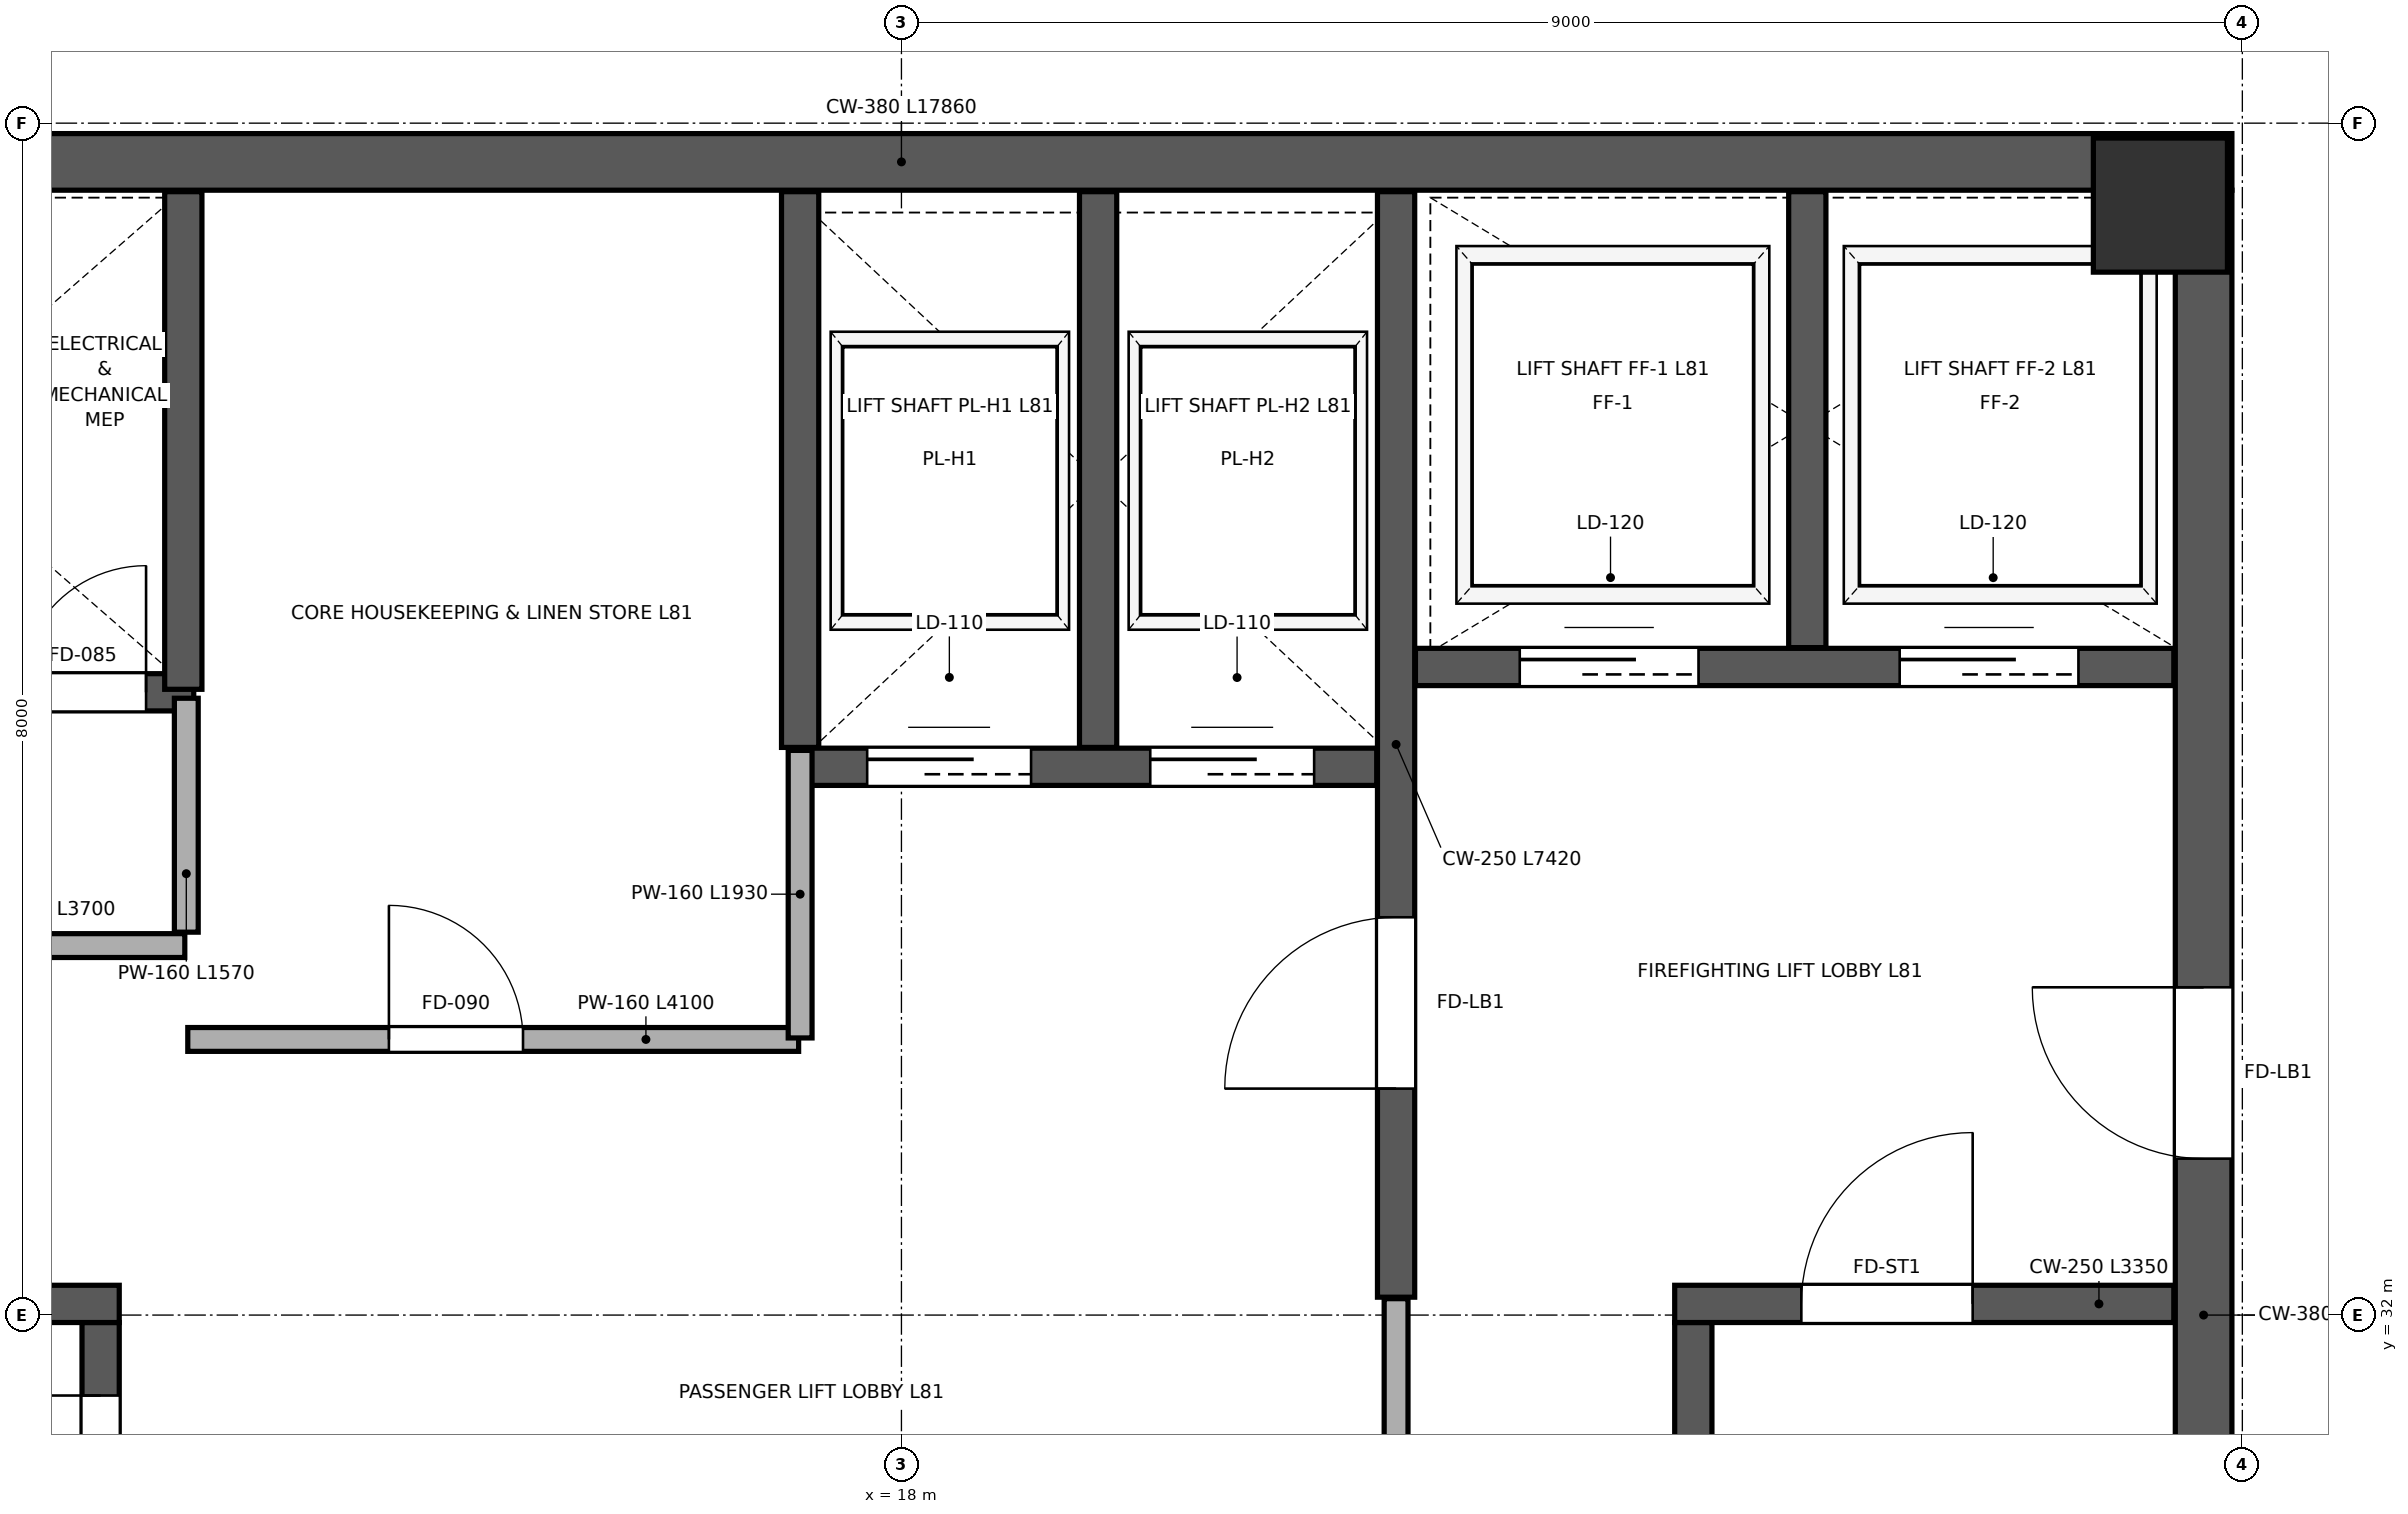
"""IFC4 building model, lengths in metres.
Left out: names, types, materials, properties, quantities, classifications, styles, units other than length and angle.
Written with IfcOpenShell. Run it as: python <this file> out.ifc"""

import sys

from ifc_helpers import new_model, si_unit, direction, frame, frame_2d, origin, origin_2d, place, context, subcontext, project, spatial, rectangle, extrude, source, transform, mapped, element, fill, save


model = new_model("IFC4")
c1 = context("Model", 3, precision=1e-05, world=origin(), true_north=direction((0.0, 1.0)))
c2 = subcontext(c1, "Body", "Model", "MODEL_VIEW")
j1 = project(units=[si_unit("LENGTHUNIT", "METRE"), si_unit("PLANEANGLEUNIT", "RADIAN")], contexts=[c1])
p1 = place(None, origin())
s1 = spatial("IfcSite", under=j1, at=p1, CompositionType="ELEMENT")
p2 = place(p1, origin())
s2 = spatial("IfcBuilding", under=s1, at=p2, CompositionType="ELEMENT")
p3 = place(p2, frame((0.0, 0.0, 360.0)))
s3 = spatial("IfcBuildingStorey", under=s2, at=p3, CompositionType="ELEMENT", Elevation=360.0)
m1 = source(origin(), c2, "Body", "SweptSolid", [
    extrude(rectangle(XDim=0.9, YDim=0.9, at=origin_2d()), origin(), (0.0, 0.0, 1.0), 5.999),
])
p4 = place(p3, frame((26.45, 39.45, 0.001), z_axis=(0.0, 0.0, 1.0), x_axis=(1.0, 0.0, 0.0)))
e1 = element("IfcColumn", 1, at=p4, inside=s3, PredefinedType="COLUMN", context=c2, shape_type="MappedRepresentation", body=[
    mapped(m1, transform((0.0, 0.0, 0.0), scale=1.0)),
])
p5 = place(p3, frame((26.74, 24.45, 0.0), z_axis=(0.0, 0.0, 1.0), x_axis=(0.0, 1.0, 0.0)))
e2 = element("IfcWall", 2, at=p5, inside=s3, PredefinedType="SHEAR", context=c2, shape_type="SweptSolid", body=[
    extrude(rectangle(XDim=15.1, YDim=0.38, at=frame_2d((7.55, 0.0))), origin(), (0.0, 0.0, 1.0), 5.72),
])
p6 = place(p5, frame((8.6, 0.0, 0.0)))
e3 = element("IfcOpeningElement", 3, at=p6, cuts=e2, PredefinedType="OPENING", context=c2, shape_type="SweptSolid", body=[
    extrude(rectangle(XDim=1.15, YDim=2.2, at=frame_2d((0.575, 1.1))), frame((0.0, 0.2, 0.0), z_axis=(0.0, -1.0, 0.0), x_axis=(1.0, 0.0, 0.0)), (0.0, 0.0, 1.0), 0.4),
])
p7 = place(p3, frame((9.07, 39.74, 0.0), z_axis=(0.0, 0.0, 1.0), x_axis=(1.0, 0.0, 0.0)))
e4 = element("IfcWall", 4, at=p7, inside=s3, PredefinedType="SHEAR", context=c2, shape_type="SweptSolid", body=[
    extrude(rectangle(XDim=17.86, YDim=0.38, at=frame_2d((8.93, 0.0))), origin(), (0.0, 0.0, 1.0), 5.72),
])
p8 = place(p3, frame((12.625, 24.46, 0.0), z_axis=(0.0, 0.0, 1.0), x_axis=(0.0, 1.0, 0.0)))
e5 = element("IfcWall", 5, at=p8, inside=s3, PredefinedType="SHEAR", context=c2, shape_type="SweptSolid", body=[
    extrude(rectangle(XDim=7.49, YDim=0.25, at=frame_2d((3.745, 0.0))), origin(), (0.0, 0.0, 1.0), 5.72),
])
p9 = place(p8, frame((5.85, 0.0, 0.0)))
e6 = element("IfcOpeningElement", 6, at=p9, cuts=e5, PredefinedType="OPENING", context=c2, shape_type="SweptSolid", body=[
    extrude(rectangle(XDim=1.15, YDim=2.2, at=frame_2d((0.575, 1.1))), frame((0.0, 0.135, 0.0), z_axis=(0.0, -1.0, 0.0), x_axis=(1.0, 0.0, 0.0)), (0.0, 0.0, 1.0), 0.27),
])
p10 = place(p3, frame((9.46, 32.075, 0.0), z_axis=(0.0, 0.0, 1.0), x_axis=(1.0, 0.0, 0.0)))
e7 = element("IfcWall", 7, at=p10, inside=s3, PredefinedType="SHEAR", context=c2, shape_type="SweptSolid", body=[
    extrude(rectangle(XDim=3.29, YDim=0.25, at=frame_2d((1.645, 0.0))), origin(), (0.0, 0.0, 1.0), 5.72),
])
p11 = place(p3, frame((23.315, 24.46, 0.0), z_axis=(0.0, 0.0, 1.0), x_axis=(0.0, 1.0, 0.0)))
e8 = element("IfcWall", 8, at=p11, inside=s3, PredefinedType="SHEAR", context=c2, shape_type="SweptSolid", body=[
    extrude(rectangle(XDim=7.49, YDim=0.25, at=frame_2d((3.745, 0.0))), origin(), (0.0, 0.0, 1.0), 5.72),
])
p12 = place(p3, frame((23.19, 32.075, 0.0), z_axis=(0.0, 0.0, 1.0), x_axis=(1.0, 0.0, 0.0)))
e9 = element("IfcWall", 9, at=p12, inside=s3, PredefinedType="SHEAR", context=c2, shape_type="SweptSolid", body=[
    extrude(rectangle(XDim=3.35, YDim=0.25, at=frame_2d((1.675, 0.0))), origin(), (0.0, 0.0, 1.0), 5.72),
])
p13 = place(p12, frame((0.85, 0.0, 0.0)))
e10 = element("IfcOpeningElement", 10, at=p13, cuts=e9, PredefinedType="OPENING", context=c2, shape_type="SweptSolid", body=[
    extrude(rectangle(XDim=1.15, YDim=2.2, at=frame_2d((0.575, 1.1))), frame((0.0, 0.135, 0.0), z_axis=(0.0, -1.0, 0.0), x_axis=(1.0, 0.0, 0.0)), (0.0, 0.0, 1.0), 0.27),
])
p14 = place(p3, frame((21.32, 32.12, 0.0), z_axis=(0.0, 0.0, 1.0), x_axis=(0.0, 1.0, 0.0)))
e11 = element("IfcWall", 11, at=p14, inside=s3, PredefinedType="SHEAR", context=c2, shape_type="SweptSolid", body=[
    extrude(rectangle(XDim=7.42, YDim=0.25, at=frame_2d((3.71, 0.0))), origin(), (0.0, 0.0, 1.0), 5.72),
])
p15 = place(p14, frame((1.4, 0.0, 0.0)))
e12 = element("IfcOpeningElement", 12, at=p15, cuts=e11, PredefinedType="OPENING", context=c2, shape_type="SweptSolid", body=[
    extrude(rectangle(XDim=1.15, YDim=2.2, at=frame_2d((0.575, 1.1))), frame((0.0, 0.135, 0.0), z_axis=(0.0, -1.0, 0.0), x_axis=(1.0, 0.0, 0.0)), (0.0, 0.0, 1.0), 0.27),
])
p16 = place(p3, frame((9.46, 36.18, 0.0), z_axis=(0.0, 0.0, 1.0), x_axis=(1.0, 0.0, 0.0)))
e13 = element("IfcWall", 13, at=p16, inside=s3, PredefinedType="SHEAR", context=c2, shape_type="SweptSolid", body=[
    extrude(rectangle(XDim=3.79, YDim=0.25, at=frame_2d((1.895, 0.0))), origin(), (0.0, 0.0, 1.0), 5.72),
])
p17 = place(p16, frame((2.62, 0.0, 0.0)))
e14 = element("IfcOpeningElement", 14, at=p17, cuts=e13, PredefinedType="OPENING", context=c2, shape_type="SweptSolid", body=[
    extrude(rectangle(XDim=0.85, YDim=2.1, at=frame_2d((0.425, 1.05))), frame((0.0, 0.135, 0.0), z_axis=(0.0, -1.0, 0.0), x_axis=(1.0, 0.0, 0.0)), (0.0, 0.0, 1.0), 0.27),
])
p18 = place(p16, frame((0.85, 0.0, 0.0)))
e15 = element("IfcOpeningElement", 15, at=p18, cuts=e13, PredefinedType="OPENING", context=c2, shape_type="SweptSolid", body=[
    extrude(rectangle(XDim=1.3, YDim=2.25, at=frame_2d((0.65, 1.125))), frame((0.0, 0.135, 0.0), z_axis=(0.0, -1.0, 0.0), x_axis=(1.0, 0.0, 0.0)), (0.0, 0.0, 1.0), 0.27),
])
p19 = place(p3, frame((21.45, 36.35, 0.0), z_axis=(0.0, 0.0, 1.0), x_axis=(1.0, 0.0, 0.0)))
e16 = element("IfcWall", 16, at=p19, inside=s3, PredefinedType="SHEAR", context=c2, shape_type="SweptSolid", body=[
    extrude(rectangle(XDim=5.09, YDim=0.25, at=frame_2d((2.545, 0.0))), origin(), (0.0, 0.0, 1.0), 5.72),
])
p20 = place(p19, frame((0.7, 0.0, 0.0)))
e17 = element("IfcOpeningElement", 17, at=p20, cuts=e16, PredefinedType="OPENING", context=c2, shape_type="SweptSolid", body=[
    extrude(rectangle(XDim=1.2, YDim=2.2, at=frame_2d((0.6, 1.1))), frame((0.0, 0.135, 0.0), z_axis=(0.0, -1.0, 0.0), x_axis=(1.0, 0.0, 0.0)), (0.0, 0.0, 1.0), 0.27),
])
p21 = place(p19, frame((3.25, 0.0, 0.0)))
e18 = element("IfcOpeningElement", 18, at=p21, cuts=e16, PredefinedType="OPENING", context=c2, shape_type="SweptSolid", body=[
    extrude(rectangle(XDim=1.2, YDim=2.2, at=frame_2d((0.6, 1.1))), frame((0.0, 0.135, 0.0), z_axis=(0.0, -1.0, 0.0), x_axis=(1.0, 0.0, 0.0)), (0.0, 0.0, 1.0), 0.27),
])
p22 = place(p3, frame((24.08, 36.48, 0.0), z_axis=(0.0, 0.0, 1.0), x_axis=(0.0, 1.0, 0.0)))
e19 = element("IfcWall", 19, at=p22, inside=s3, PredefinedType="SHEAR", context=c2, shape_type="SweptSolid", body=[
    extrude(rectangle(XDim=3.06, YDim=0.25, at=frame_2d((1.53, 0.0))), origin(), (0.0, 0.0, 1.0), 5.72),
])
p23 = place(p3, frame((13.18, 36.2, 0.0), z_axis=(0.0, 0.0, 1.0), x_axis=(0.0, 1.0, 0.0)))
e20 = element("IfcWall", 20, at=p23, inside=s3, PredefinedType="SHEAR", context=c2, shape_type="SweptSolid", body=[
    extrude(rectangle(XDim=3.34, YDim=0.25, at=frame_2d((1.67, 0.0))), origin(), (0.0, 0.0, 1.0), 5.72),
])
p24 = place(p3, frame((17.32, 35.68, 0.0), z_axis=(0.0, 0.0, 1.0), x_axis=(1.0, 0.0, 0.0)))
e21 = element("IfcWall", 21, at=p24, inside=s3, PredefinedType="SHEAR", context=c2, shape_type="SweptSolid", body=[
    extrude(rectangle(XDim=3.87, YDim=0.25, at=frame_2d((1.935, 0.0))), origin(), (0.0, 0.0, 1.0), 5.72),
])
p25 = place(p24, frame((0.45, 0.0, 0.0)))
e22 = element("IfcOpeningElement", 22, at=p25, cuts=e21, PredefinedType="OPENING", context=c2, shape_type="SweptSolid", body=[
    extrude(rectangle(XDim=1.1, YDim=2.2, at=frame_2d((0.55, 1.1))), frame((0.0, 0.135, 0.0), z_axis=(0.0, -1.0, 0.0), x_axis=(1.0, 0.0, 0.0)), (0.0, 0.0, 1.0), 0.27),
])
p26 = place(p24, frame((2.35, 0.0, 0.0)))
e23 = element("IfcOpeningElement", 23, at=p26, cuts=e21, PredefinedType="OPENING", context=c2, shape_type="SweptSolid", body=[
    extrude(rectangle(XDim=1.1, YDim=2.2, at=frame_2d((0.55, 1.1))), frame((0.0, 0.135, 0.0), z_axis=(0.0, -1.0, 0.0), x_axis=(1.0, 0.0, 0.0)), (0.0, 0.0, 1.0), 0.27),
])
for number, where, z_axis, x_axis in (
    (24, (17.32, 35.81, 0.0), (0.0, 0.0, 1.0), (0.0, 1.0, 0.0)),
    (25, (19.32, 35.81, 0.0), (0.0, 0.0, 1.0), (0.0, 1.0, 0.0)),
):
    element("IfcWall", number, at=place(p3, frame(where, z_axis=z_axis, x_axis=x_axis)), inside=s3, PredefinedType="SHEAR", context=c2, shape_type="SweptSolid", body=[
        extrude(rectangle(XDim=3.73, YDim=0.25, at=frame_2d((1.865, 0.0))), origin(), (0.0, 0.0, 1.0), 5.72),
    ])
p27 = place(p3, frame((9.49, 34.48, 0.0), z_axis=(0.0, 0.0, 1.0), x_axis=(1.0, 0.0, 0.0)))
e26 = element("IfcWall", 26, at=p27, inside=s3, PredefinedType="PARTITIONING", context=c2, shape_type="SweptSolid", body=[
    extrude(rectangle(XDim=3.7, YDim=0.16, at=frame_2d((1.85, 0.0))), origin(), (0.0, 0.0, 1.0), 5.72),
])
p28 = place(p27, frame((1.15, 0.0, 0.0)))
e27 = element("IfcOpeningElement", 27, at=p28, cuts=e26, PredefinedType="OPENING", context=c2, shape_type="SweptSolid", body=[
    extrude(rectangle(XDim=0.9, YDim=2.15, at=frame_2d((0.45, 1.075))), frame((0.0, 0.09, 0.0), z_axis=(0.0, -1.0, 0.0), x_axis=(1.0, 0.0, 0.0)), (0.0, 0.0, 1.0), 0.18),
])
p29 = place(p3, frame((13.2, 34.57, 0.0), z_axis=(0.0, 0.0, 1.0), x_axis=(0.0, 1.0, 0.0)))
e28 = element("IfcWall", 28, at=p29, inside=s3, PredefinedType="PARTITIONING", context=c2, shape_type="SweptSolid", body=[
    extrude(rectangle(XDim=1.57, YDim=0.16, at=frame_2d((0.785, 0.0))), origin(), (0.0, 0.0, 1.0), 5.72),
])
p30 = place(p3, frame((13.21, 33.85, 0.0), z_axis=(0.0, 0.0, 1.0), x_axis=(1.0, 0.0, 0.0)))
e29 = element("IfcWall", 29, at=p30, inside=s3, PredefinedType="PARTITIONING", context=c2, shape_type="SweptSolid", body=[
    extrude(rectangle(XDim=4.1, YDim=0.16, at=frame_2d((2.05, 0.0))), origin(), (0.0, 0.0, 1.0), 5.72),
])
p31 = place(p30, frame((1.35, 0.0, 0.0)))
e30 = element("IfcOpeningElement", 30, at=p31, cuts=e29, PredefinedType="OPENING", context=c2, shape_type="SweptSolid", body=[
    extrude(rectangle(XDim=0.9, YDim=2.15, at=frame_2d((0.45, 1.075))), frame((0.0, 0.09, 0.0), z_axis=(0.0, -1.0, 0.0), x_axis=(1.0, 0.0, 0.0)), (0.0, 0.0, 1.0), 0.18),
])
p32 = place(p3, frame((17.32, 33.86, 0.0), z_axis=(0.0, 0.0, 1.0), x_axis=(0.0, 1.0, 0.0)))
e31 = element("IfcWall", 31, at=p32, inside=s3, PredefinedType="PARTITIONING", context=c2, shape_type="SweptSolid", body=[
    extrude(rectangle(XDim=1.93, YDim=0.16, at=frame_2d((0.965, 0.0))), origin(), (0.0, 0.0, 1.0), 5.72),
])
p33 = place(p3, frame((21.32, 29.19, 0.0), z_axis=(0.0, 0.0, 1.0), x_axis=(0.0, 1.0, 0.0)))
e32 = element("IfcWall", 32, at=p33, inside=s3, PredefinedType="PARTITIONING", context=c2, shape_type="SweptSolid", body=[
    extrude(rectangle(XDim=2.92, YDim=0.16, at=frame_2d((1.46, 0.0))), origin(), (0.0, 0.0, 1.0), 5.72),
])
p34 = place(p3, frame((25.996, 48.269, 0.0), z_axis=(0.0, 0.0, 1.0), x_axis=(0.382683927115, -0.923879327579, 0.0)))
e33 = element("IfcWall", 33, at=p34, inside=s3, PredefinedType="PARTITIONING", context=c2, shape_type="SweptSolid", body=[
    extrude(rectangle(XDim=10.82, YDim=0.115, at=frame_2d((5.41, 0.0))), origin(), (0.0, 0.0, 1.0), 5.72),
])
p35 = place(p34, frame((3.1, 0.0, 0.0)))
e34 = element("IfcOpeningElement", 34, at=p35, cuts=e33, PredefinedType="OPENING", context=c2, shape_type="SweptSolid", body=[
    extrude(rectangle(XDim=0.95, YDim=2.15, at=frame_2d((0.475, 1.075))), frame((0.0, 0.067, 0.0), z_axis=(0.0, -1.0, 0.0), x_axis=(1.0, 0.0, 0.0)), (0.0, 0.0, 1.0), 0.135),
])
m2 = source(origin(), c2, "Body", "SweptSolid", [
    extrude(rectangle(XDim=1.15, YDim=2.2, at=frame_2d((0.575, 1.1))), frame((0.0, 0.025, 0.0), z_axis=(0.0, -1.0, 0.0), x_axis=(1.0, 0.0, 0.0)), (0.0, 0.0, 1.0), 0.05),
])
p36 = place(p9, origin())
e35 = element("IfcDoor", 35, at=p36, inside=s3, OperationType="SINGLE_SWING_RIGHT", PredefinedType="DOOR", context=c2, shape_type="MappedRepresentation", body=[
    mapped(m2, transform((0.0, 0.0, 0.0), scale=1.0)),
])
fill(e6, e35)
m3 = source(origin(), c2, "Body", "SweptSolid", [
    extrude(rectangle(XDim=1.15, YDim=2.2, at=frame_2d((0.575, 1.1))), frame((0.0, 0.025, 0.0), z_axis=(0.0, -1.0, 0.0), x_axis=(1.0, 0.0, 0.0)), (0.0, 0.0, 1.0), 0.05),
])
p37 = place(p15, origin())
e36 = element("IfcDoor", 36, at=p37, inside=s3, OperationType="SINGLE_SWING_LEFT", PredefinedType="DOOR", context=c2, shape_type="MappedRepresentation", body=[
    mapped(m3, transform((0.0, 0.0, 0.0), scale=1.0)),
])
fill(e12, e36)
p38 = place(p13, origin())
e37 = element("IfcDoor", 37, at=p38, inside=s3, OperationType="SINGLE_SWING_RIGHT", PredefinedType="DOOR", context=c2, shape_type="MappedRepresentation", body=[
    mapped(m2, transform((0.0, 0.0, 0.0), scale=1.0)),
])
fill(e10, e37)
p39 = place(p6, origin())
e38 = element("IfcDoor", 38, at=p39, inside=s3, OperationType="SINGLE_SWING_RIGHT", PredefinedType="DOOR", context=c2, shape_type="MappedRepresentation", body=[
    mapped(m3, transform((0.0, 0.0, 0.0), scale=1.0)),
])
fill(e3, e38)
m4 = source(origin(), c2, "Body", "SweptSolid", [
    extrude(rectangle(XDim=0.85, YDim=2.1, at=frame_2d((0.425, 1.05))), frame((0.0, 0.025, 0.0), z_axis=(0.0, -1.0, 0.0), x_axis=(1.0, 0.0, 0.0)), (0.0, 0.0, 1.0), 0.05),
])
p40 = place(p17, origin())
e39 = element("IfcDoor", 39, at=p40, inside=s3, OperationType="SINGLE_SWING_RIGHT", PredefinedType="DOOR", context=c2, shape_type="MappedRepresentation", body=[
    mapped(m4, transform((0.0, 0.0, 0.0), scale=1.0)),
])
fill(e14, e39)
m5 = source(origin(), c2, "Body", "SweptSolid", [
    extrude(rectangle(XDim=1.1, YDim=2.2, at=frame_2d((0.55, 1.1))), frame((0.0, 0.025, 0.0), z_axis=(0.0, -1.0, 0.0), x_axis=(1.0, 0.0, 0.0)), (0.0, 0.0, 1.0), 0.05),
])
p41 = place(p25, origin())
e40 = element("IfcDoor", 40, at=p41, inside=s3, OperationType="SLIDING_TO_LEFT", PredefinedType="DOOR", context=c2, shape_type="MappedRepresentation", body=[
    mapped(m5, transform((0.0, 0.0, 0.0), scale=1.0)),
])
fill(e22, e40)
p42 = place(p26, origin())
e41 = element("IfcDoor", 41, at=p42, inside=s3, OperationType="SLIDING_TO_RIGHT", PredefinedType="DOOR", context=c2, shape_type="MappedRepresentation", body=[
    mapped(m5, transform((0.0, 0.0, 0.0), scale=1.0)),
])
fill(e23, e41)
m6 = source(origin(), c2, "Body", "SweptSolid", [
    extrude(rectangle(XDim=1.2, YDim=2.2, at=frame_2d((0.6, 1.1))), frame((0.0, 0.025, 0.0), z_axis=(0.0, -1.0, 0.0), x_axis=(1.0, 0.0, 0.0)), (0.0, 0.0, 1.0), 0.05),
])
p43 = place(p20, origin())
e42 = element("IfcDoor", 42, at=p43, inside=s3, OperationType="SLIDING_TO_LEFT", PredefinedType="DOOR", context=c2, shape_type="MappedRepresentation", body=[
    mapped(m6, transform((0.0, 0.0, 0.0), scale=1.0)),
])
fill(e17, e42)
p44 = place(p21, origin())
e43 = element("IfcDoor", 43, at=p44, inside=s3, OperationType="SLIDING_TO_RIGHT", PredefinedType="DOOR", context=c2, shape_type="MappedRepresentation", body=[
    mapped(m6, transform((0.0, 0.0, 0.0), scale=1.0)),
])
fill(e18, e43)
m7 = source(origin(), c2, "Body", "SweptSolid", [
    extrude(rectangle(XDim=0.9, YDim=2.15, at=frame_2d((0.45, 1.075))), frame((0.0, 0.025, 0.0), z_axis=(0.0, -1.0, 0.0), x_axis=(1.0, 0.0, 0.0)), (0.0, 0.0, 1.0), 0.05),
])
p45 = place(p31, origin())
e44 = element("IfcDoor", 44, at=p45, inside=s3, OperationType="SINGLE_SWING_LEFT", PredefinedType="DOOR", context=c2, shape_type="MappedRepresentation", body=[
    mapped(m7, transform((0.0, 0.0, 0.0), scale=1.0)),
])
fill(e30, e44)
save(model, sys.argv[1])
